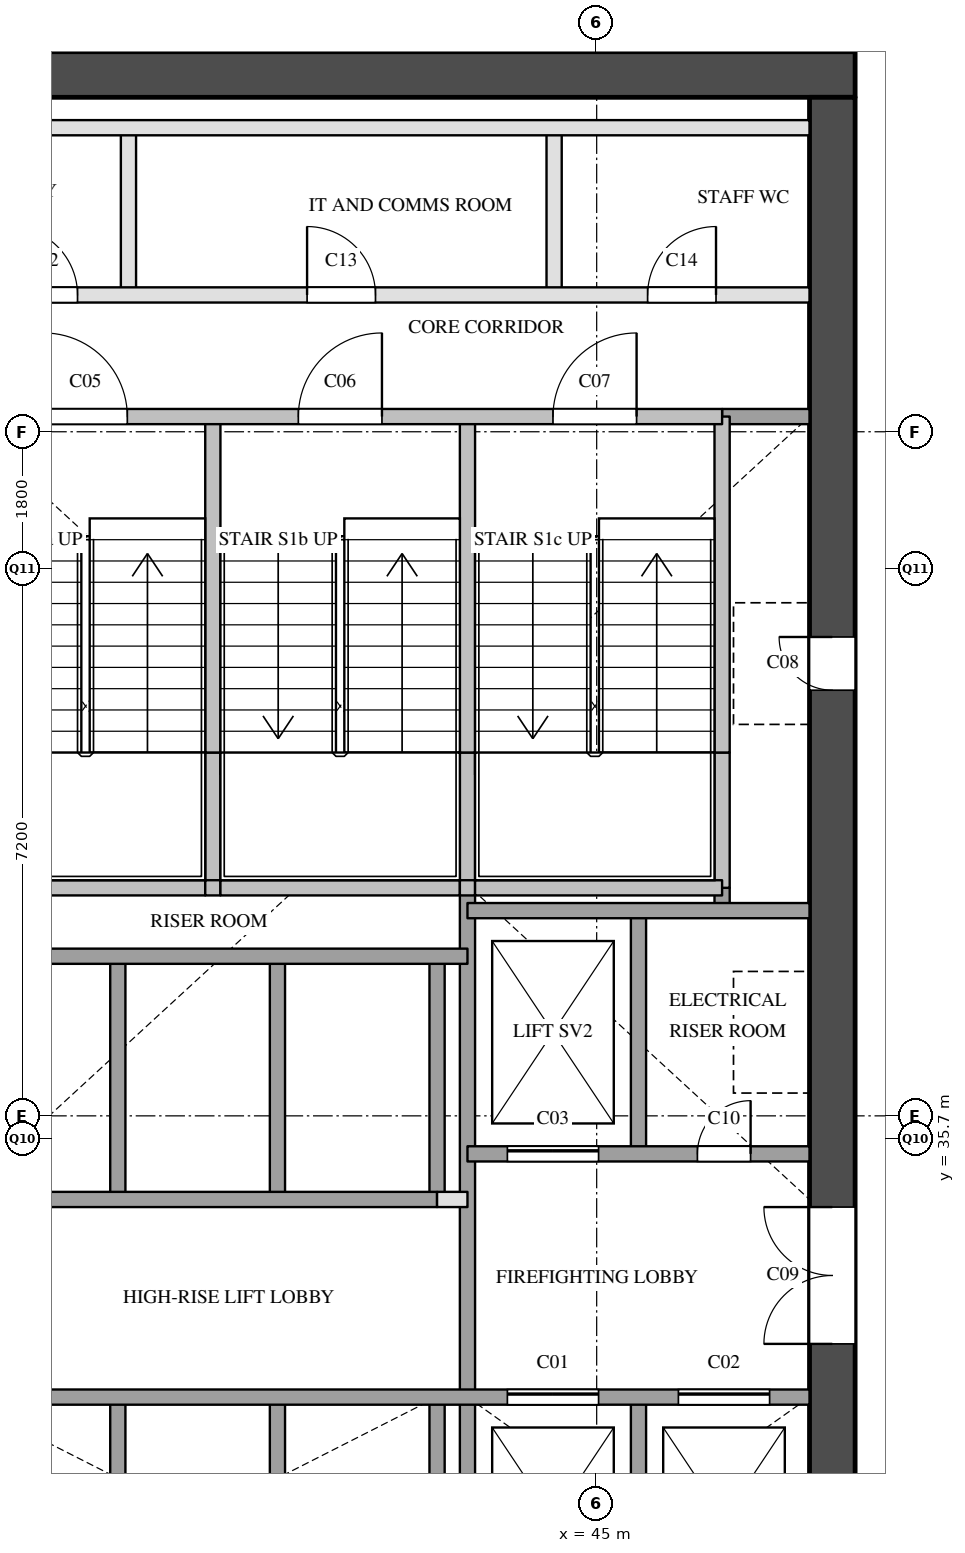
"""IFC4 building model, lengths in metres.
Left out: names, types, materials, properties, quantities, classifications, styles, units other than length and angle.
Written with IfcOpenShell. Run it as: python <this file> out.ifc"""

import sys

from ifc_helpers import new_model, si_unit, direction, frame, frame_2d, origin, place, context, subcontext, project, spatial, rectangle, extrude, element, fill, save


model = new_model("IFC4")
c1 = context("Model", 3, precision=1e-05, world=origin(), true_north=direction((0.0, 1.0)))
c2 = subcontext(c1, "Body", "Model", "MODEL_VIEW")
j1 = project(units=[si_unit("LENGTHUNIT", "METRE"), si_unit("PLANEANGLEUNIT", "RADIAN")], contexts=[c1])
p1 = place(None, origin())
s1 = spatial("IfcSite", under=j1, at=p1, CompositionType="ELEMENT")
p2 = place(p1, origin())
s2 = spatial("IfcBuilding", under=s1, at=p2, CompositionType="ELEMENT")
p3 = place(p2, frame((0.0, 0.0, 81.6)))
s3 = spatial("IfcBuildingStorey", under=s2, at=p3, CompositionType="ELEMENT", Elevation=81.6)
p4 = place(p3, frame((36.0, 49.7, 0.0), z_axis=(0.0, 0.0, 1.0), x_axis=(1.0, 0.0, 0.0)))
e1 = element("IfcWall", 1, at=p4, inside=s3, PredefinedType="SHEAR", context=c2, shape_type="SweptSolid", body=[
    extrude(rectangle(XDim=12.4, YDim=0.6, at=frame_2d((6.2, 0.0))), origin(), (0.0, 0.0, 1.0), 3.5),
])
p5 = place(p3, frame((48.1, 29.1, 0.0), z_axis=(0.0, 0.0, 1.0), x_axis=(0.0, 1.0, 0.0)))
e2 = element("IfcWall", 2, at=p5, inside=s3, PredefinedType="SHEAR", context=c2, shape_type="SweptSolid", body=[
    extrude(rectangle(XDim=20.3, YDim=0.6, at=frame_2d((10.15, 0.0))), origin(), (0.0, 0.0, 1.0), 3.5),
])
p6 = place(p5, frame((12.5, 0.0, 0.0)))
e3 = element("IfcOpeningElement", 3, at=p6, cuts=e2, PredefinedType="OPENING", context=c2, shape_type="SweptSolid", body=[
    extrude(rectangle(XDim=0.7, YDim=2.1, at=frame_2d((0.35, 1.05))), frame((0.0, 0.31, 0.0), z_axis=(0.0, -1.0, 0.0), x_axis=(1.0, 0.0, 0.0)), (0.0, 0.0, 1.0), 0.62),
])
p7 = place(p5, frame((3.9, 0.0, 0.0)))
e4 = element("IfcOpeningElement", 4, at=p7, cuts=e2, PredefinedType="OPENING", context=c2, shape_type="SweptSolid", body=[
    extrude(rectangle(XDim=1.8, YDim=2.1, at=frame_2d((0.9, 1.05))), frame((0.0, 0.31, 0.0), z_axis=(0.0, -1.0, 0.0), x_axis=(1.0, 0.0, 0.0)), (0.0, 0.0, 1.0), 0.62),
])
p8 = place(p3, frame((38.7, 29.1, 0.0), z_axis=(0.0, 0.0, 1.0), x_axis=(0.0, 1.0, 0.0)))
e5 = element("IfcWall", 5, at=p8, inside=s3, PredefinedType="SOLIDWALL", context=c2, shape_type="SweptSolid", body=[
    extrude(rectangle(XDim=3.2, YDim=0.2, at=frame_2d((1.6, 0.0))), origin(), (0.0, 0.0, 1.0), 3.5),
])
p9 = place(p3, frame((38.7, 34.9, 0.0), z_axis=(0.0, 0.0, 1.0), x_axis=(0.0, 1.0, 0.0)))
e6 = element("IfcWall", 6, at=p9, inside=s3, PredefinedType="SOLIDWALL", context=c2, shape_type="SweptSolid", body=[
    extrude(rectangle(XDim=3.2, YDim=0.2, at=frame_2d((1.6, 0.0))), origin(), (0.0, 0.0, 1.0), 3.5),
])
p10 = place(p3, frame((38.84, 46.8, 0.0), z_axis=(0.0, 0.0, 1.0), x_axis=(0.0, 1.0, 0.0)))
e7 = element("IfcWall", 7, at=p10, inside=s3, PredefinedType="PARTITIONING", context=c2, shape_type="SweptSolid", body=[
    extrude(rectangle(XDim=2.2, YDim=0.2, at=frame_2d((1.1, 0.0))), origin(), (0.0, 0.0, 1.0), 3.5),
])
p11 = place(p3, frame((39.95, 39.0, 0.0), z_axis=(0.0, 0.0, 1.0), x_axis=(0.0, 1.0, 0.0)))
e8 = element("IfcWall", 8, at=p11, inside=s3, PredefinedType="SOLIDWALL", context=c2, shape_type="SweptSolid", body=[
    extrude(rectangle(XDim=1.78, YDim=0.2, at=frame_2d((0.89, 0.0))), origin(), (0.0, 0.0, 1.0), 3.5),
])
p12 = place(p3, frame((39.95, 40.78, 0.0), z_axis=(0.0, 0.0, 1.0), x_axis=(0.0, 1.0, 0.0)))
e9 = element("IfcWall", 9, at=p12, inside=s3, PredefinedType="SOLIDWALL", context=c2, shape_type="SweptSolid", body=[
    extrude(rectangle(XDim=4.42, YDim=0.2, at=frame_2d((2.21, 0.0))), origin(), (0.0, 0.0, 1.0), 3.5),
])
p13 = place(p3, frame((40.8, 29.1, 0.0), z_axis=(0.0, 0.0, 1.0), x_axis=(0.0, 1.0, 0.0)))
e10 = element("IfcWall", 10, at=p13, inside=s3, PredefinedType="SOLIDWALL", context=c2, shape_type="SweptSolid", body=[
    extrude(rectangle(XDim=3.2, YDim=0.2, at=frame_2d((1.6, 0.0))), origin(), (0.0, 0.0, 1.0), 3.5),
])
p14 = place(p3, frame((40.8, 34.9, 0.0), z_axis=(0.0, 0.0, 1.0), x_axis=(0.0, 1.0, 0.0)))
e11 = element("IfcWall", 11, at=p14, inside=s3, PredefinedType="SOLIDWALL", context=c2, shape_type="SweptSolid", body=[
    extrude(rectangle(XDim=3.2, YDim=0.2, at=frame_2d((1.6, 0.0))), origin(), (0.0, 0.0, 1.0), 3.5),
])
p15 = place(p3, frame((42.9, 29.1, 0.0), z_axis=(0.0, 0.0, 1.0), x_axis=(0.0, 1.0, 0.0)))
e12 = element("IfcWall", 12, at=p15, inside=s3, PredefinedType="SOLIDWALL", context=c2, shape_type="SweptSolid", body=[
    extrude(rectangle(XDim=3.2, YDim=0.2, at=frame_2d((1.6, 0.0))), origin(), (0.0, 0.0, 1.0), 3.5),
])
p16 = place(p3, frame((42.9, 34.9, 0.0), z_axis=(0.0, 0.0, 1.0), x_axis=(0.0, 1.0, 0.0)))
e13 = element("IfcWall", 13, at=p16, inside=s3, PredefinedType="SOLIDWALL", context=c2, shape_type="SweptSolid", body=[
    extrude(rectangle(XDim=3.2, YDim=0.2, at=frame_2d((1.6, 0.0))), origin(), (0.0, 0.0, 1.0), 3.5),
])
p17 = place(p3, frame((43.3, 29.1, 0.0), z_axis=(0.0, 0.0, 1.0), x_axis=(0.0, 1.0, 0.0)))
e14 = element("IfcWall", 14, at=p17, inside=s3, PredefinedType="SOLIDWALL", context=c2, shape_type="SweptSolid", body=[
    extrude(rectangle(XDim=9.9, YDim=0.2, at=frame_2d((4.95, 0.0))), origin(), (0.0, 0.0, 1.0), 3.5),
])
p18 = place(p3, frame((43.3, 39.0, 0.0), z_axis=(0.0, 0.0, 1.0), x_axis=(0.0, 1.0, 0.0)))
e15 = element("IfcWall", 15, at=p18, inside=s3, PredefinedType="SOLIDWALL", context=c2, shape_type="SweptSolid", body=[
    extrude(rectangle(XDim=1.78, YDim=0.2, at=frame_2d((0.89, 0.0))), origin(), (0.0, 0.0, 1.0), 3.5),
])
p19 = place(p3, frame((43.3, 40.78, 0.0), z_axis=(0.0, 0.0, 1.0), x_axis=(0.0, 1.0, 0.0)))
e16 = element("IfcWall", 16, at=p19, inside=s3, PredefinedType="SOLIDWALL", context=c2, shape_type="SweptSolid", body=[
    extrude(rectangle(XDim=4.42, YDim=0.2, at=frame_2d((2.21, 0.0))), origin(), (0.0, 0.0, 1.0), 3.5),
])
p20 = place(p3, frame((44.44, 46.8, 0.0), z_axis=(0.0, 0.0, 1.0), x_axis=(0.0, 1.0, 0.0)))
e17 = element("IfcWall", 17, at=p20, inside=s3, PredefinedType="PARTITIONING", context=c2, shape_type="SweptSolid", body=[
    extrude(rectangle(XDim=2.2, YDim=0.2, at=frame_2d((1.1, 0.0))), origin(), (0.0, 0.0, 1.0), 3.5),
])
for number, where, z_axis, x_axis in (
    (18, (45.55, 29.1, 0.0), (0.0, 0.0, 1.0), (0.0, 1.0, 0.0)),
    (19, (45.55, 35.5, 0.0), (0.0, 0.0, 1.0), (0.0, 1.0, 0.0)),
):
    element("IfcWall", number, at=place(p3, frame(where, z_axis=z_axis, x_axis=x_axis)), inside=s3, PredefinedType="SOLIDWALL", context=c2, shape_type="SweptSolid", body=[
        extrude(rectangle(XDim=3.2, YDim=0.2, at=frame_2d((1.6, 0.0))), origin(), (0.0, 0.0, 1.0), 3.5),
    ])
p21 = place(p3, frame((46.65, 38.7, 0.0), z_axis=(0.0, 0.0, 1.0), x_axis=(0.0, 1.0, 0.0)))
e20 = element("IfcWall", 20, at=p21, inside=s3, PredefinedType="SOLIDWALL", context=c2, shape_type="SweptSolid", body=[
    extrude(rectangle(XDim=0.3, YDim=0.2, at=frame_2d((0.15, 0.0))), origin(), (0.0, 0.0, 1.0), 3.5),
])
p22 = place(p3, frame((46.65, 39.0, 0.0), z_axis=(0.0, 0.0, 1.0), x_axis=(0.0, 1.0, 0.0)))
e21 = element("IfcWall", 21, at=p22, inside=s3, PredefinedType="SOLIDWALL", context=c2, shape_type="SweptSolid", body=[
    extrude(rectangle(XDim=1.78, YDim=0.2, at=frame_2d((0.89, 0.0))), origin(), (0.0, 0.0, 1.0), 3.5),
])
p23 = place(p3, frame((46.65, 40.78, 0.0), z_axis=(0.0, 0.0, 1.0), x_axis=(0.0, 1.0, 0.0)))
e22 = element("IfcWall", 22, at=p23, inside=s3, PredefinedType="SOLIDWALL", context=c2, shape_type="SweptSolid", body=[
    extrude(rectangle(XDim=4.42, YDim=0.2, at=frame_2d((2.21, 0.0))), origin(), (0.0, 0.0, 1.0), 3.5),
])
p24 = place(p3, frame((36.6, 32.3, 0.0), z_axis=(0.0, 0.0, 1.0), x_axis=(1.0, 0.0, 0.0)))
e23 = element("IfcWall", 23, at=p24, inside=s3, PredefinedType="SOLIDWALL", context=c2, shape_type="SweptSolid", body=[
    extrude(rectangle(XDim=11.2, YDim=0.2, at=frame_2d((5.6, 0.0))), origin(), (0.0, 0.0, 1.0), 3.5),
])
p25 = place(p24, frame((7.225, 0.0, 0.0)))
e24 = element("IfcOpeningElement", 24, at=p25, cuts=e23, PredefinedType="OPENING", context=c2, shape_type="SweptSolid", body=[
    extrude(rectangle(XDim=1.2, YDim=2.1, at=frame_2d((0.6, 1.05))), frame((0.0, 0.11, 0.0), z_axis=(0.0, -1.0, 0.0), x_axis=(1.0, 0.0, 0.0)), (0.0, 0.0, 1.0), 0.22),
])
p26 = place(p24, frame((9.475, 0.0, 0.0)))
e25 = element("IfcOpeningElement", 25, at=p26, cuts=e23, PredefinedType="OPENING", context=c2, shape_type="SweptSolid", body=[
    extrude(rectangle(XDim=1.2, YDim=2.1, at=frame_2d((0.6, 1.05))), frame((0.0, 0.11, 0.0), z_axis=(0.0, -1.0, 0.0), x_axis=(1.0, 0.0, 0.0)), (0.0, 0.0, 1.0), 0.22),
])
p27 = place(p3, frame((42.9, 34.9, 0.0), z_axis=(0.0, 0.0, 1.0), x_axis=(1.0, 0.0, 0.0)))
e26 = element("IfcWall", 26, at=p27, inside=s3, PredefinedType="PARTITIONING", context=c2, shape_type="SweptSolid", body=[
    extrude(rectangle(XDim=0.4, YDim=0.2, at=frame_2d((0.2, 0.0))), origin(), (0.0, 0.0, 1.0), 3.5),
])
p28 = place(p3, frame((36.6, 34.9, 0.0), z_axis=(0.0, 0.0, 1.0), x_axis=(1.0, 0.0, 0.0)))
e27 = element("IfcWall", 27, at=p28, inside=s3, PredefinedType="SOLIDWALL", context=c2, shape_type="SweptSolid", body=[
    extrude(rectangle(XDim=6.3, YDim=0.2, at=frame_2d((3.15, 0.0))), origin(), (0.0, 0.0, 1.0), 3.5),
])
p29 = place(p3, frame((43.3, 35.5, 0.0), z_axis=(0.0, 0.0, 1.0), x_axis=(1.0, 0.0, 0.0)))
e28 = element("IfcWall", 28, at=p29, inside=s3, PredefinedType="SOLIDWALL", context=c2, shape_type="SweptSolid", body=[
    extrude(rectangle(XDim=4.5, YDim=0.2, at=frame_2d((2.25, 0.0))), origin(), (0.0, 0.0, 1.0), 3.5),
])
p30 = place(p29, frame((0.525, 0.0, 0.0)))
e29 = element("IfcOpeningElement", 29, at=p30, cuts=e28, PredefinedType="OPENING", context=c2, shape_type="SweptSolid", body=[
    extrude(rectangle(XDim=1.2, YDim=2.1, at=frame_2d((0.6, 1.05))), frame((0.0, 0.11, 0.0), z_axis=(0.0, -1.0, 0.0), x_axis=(1.0, 0.0, 0.0)), (0.0, 0.0, 1.0), 0.22),
])
p31 = place(p29, frame((3.025, 0.0, 0.0)))
e30 = element("IfcOpeningElement", 30, at=p31, cuts=e28, PredefinedType="OPENING", context=c2, shape_type="SweptSolid", body=[
    extrude(rectangle(XDim=0.7, YDim=2.1, at=frame_2d((0.35, 1.05))), frame((0.0, 0.11, 0.0), z_axis=(0.0, -1.0, 0.0), x_axis=(1.0, 0.0, 0.0)), (0.0, 0.0, 1.0), 0.22),
])
p32 = place(p3, frame((36.6, 38.1, 0.0), z_axis=(0.0, 0.0, 1.0), x_axis=(1.0, 0.0, 0.0)))
e31 = element("IfcWall", 31, at=p32, inside=s3, PredefinedType="SOLIDWALL", context=c2, shape_type="SweptSolid", body=[
    extrude(rectangle(XDim=6.7, YDim=0.2, at=frame_2d((3.35, 0.0))), origin(), (0.0, 0.0, 1.0), 3.5),
])
p33 = place(p3, frame((43.3, 38.7, 0.0), z_axis=(0.0, 0.0, 1.0), x_axis=(1.0, 0.0, 0.0)))
e32 = element("IfcWall", 32, at=p33, inside=s3, PredefinedType="SOLIDWALL", context=c2, shape_type="SweptSolid", body=[
    extrude(rectangle(XDim=4.5, YDim=0.2, at=frame_2d((2.25, 0.0))), origin(), (0.0, 0.0, 1.0), 3.5),
])
p34 = place(p3, frame((36.6, 39.0, 0.0), z_axis=(0.0, 0.0, 1.0), x_axis=(1.0, 0.0, 0.0)))
e33 = element("IfcWall", 33, at=p34, inside=s3, PredefinedType="SOLIDWALL", context=c2, shape_type="SweptSolid", body=[
    extrude(rectangle(XDim=3.25, YDim=0.2, at=frame_2d((1.625, 0.0))), origin(), (0.0, 0.0, 1.0), 3.5),
])
p35 = place(p3, frame((39.85, 39.0, 0.0), z_axis=(0.0, 0.0, 1.0), x_axis=(1.0, 0.0, 0.0)))
e34 = element("IfcWall", 34, at=p35, inside=s3, PredefinedType="SOLIDWALL", context=c2, shape_type="SweptSolid", body=[
    extrude(rectangle(XDim=0.2, YDim=0.2, at=frame_2d((0.1, 0.0))), origin(), (0.0, 0.0, 1.0), 3.5),
])
p36 = place(p3, frame((40.05, 39.0, 0.0), z_axis=(0.0, 0.0, 1.0), x_axis=(1.0, 0.0, 0.0)))
e35 = element("IfcWall", 35, at=p36, inside=s3, PredefinedType="SOLIDWALL", context=c2, shape_type="SweptSolid", body=[
    extrude(rectangle(XDim=3.15, YDim=0.2, at=frame_2d((1.575, 0.0))), origin(), (0.0, 0.0, 1.0), 3.5),
])
p37 = place(p3, frame((43.2, 39.0, 0.0), z_axis=(0.0, 0.0, 1.0), x_axis=(1.0, 0.0, 0.0)))
e36 = element("IfcWall", 36, at=p37, inside=s3, PredefinedType="SOLIDWALL", context=c2, shape_type="SweptSolid", body=[
    extrude(rectangle(XDim=0.2, YDim=0.2, at=frame_2d((0.1, 0.0))), origin(), (0.0, 0.0, 1.0), 3.5),
])
p38 = place(p3, frame((43.4, 39.0, 0.0), z_axis=(0.0, 0.0, 1.0), x_axis=(1.0, 0.0, 0.0)))
e37 = element("IfcWall", 37, at=p38, inside=s3, PredefinedType="SOLIDWALL", context=c2, shape_type="SweptSolid", body=[
    extrude(rectangle(XDim=3.25, YDim=0.2, at=frame_2d((1.625, 0.0))), origin(), (0.0, 0.0, 1.0), 3.5),
])
p39 = place(p3, frame((46.65, 45.2, 0.0), z_axis=(0.0, 0.0, 1.0), x_axis=(1.0, 0.0, 0.0)))
e38 = element("IfcWall", 38, at=p39, inside=s3, PredefinedType="SOLIDWALL", context=c2, shape_type="SweptSolid", body=[
    extrude(rectangle(XDim=1.15, YDim=0.2, at=frame_2d((0.575, 0.0))), origin(), (0.0, 0.0, 1.0), 3.5),
])
p40 = place(p3, frame((36.6, 45.2, 0.0), z_axis=(0.0, 0.0, 1.0), x_axis=(1.0, 0.0, 0.0)))
e39 = element("IfcWall", 39, at=p40, inside=s3, PredefinedType="SOLIDWALL", context=c2, shape_type="SweptSolid", body=[
    extrude(rectangle(XDim=10.05, YDim=0.2, at=frame_2d((5.025, 0.0))), origin(), (0.0, 0.0, 1.0), 3.5),
])
p41 = place(p40, frame((1.125, 0.0, 0.0)))
e40 = element("IfcOpeningElement", 40, at=p41, cuts=e39, PredefinedType="OPENING", context=c2, shape_type="SweptSolid", body=[
    extrude(rectangle(XDim=1.1, YDim=2.1, at=frame_2d((0.55, 1.05))), frame((0.0, 0.11, 0.0), z_axis=(0.0, -1.0, 0.0), x_axis=(1.0, 0.0, 0.0)), (0.0, 0.0, 1.0), 0.22),
])
p42 = place(p40, frame((4.475, 0.0, 0.0)))
e41 = element("IfcOpeningElement", 41, at=p42, cuts=e39, PredefinedType="OPENING", context=c2, shape_type="SweptSolid", body=[
    extrude(rectangle(XDim=1.1, YDim=2.1, at=frame_2d((0.55, 1.05))), frame((0.0, 0.11, 0.0), z_axis=(0.0, -1.0, 0.0), x_axis=(1.0, 0.0, 0.0)), (0.0, 0.0, 1.0), 0.22),
])
p43 = place(p40, frame((7.825, 0.0, 0.0)))
e42 = element("IfcOpeningElement", 42, at=p43, cuts=e39, PredefinedType="OPENING", context=c2, shape_type="SweptSolid", body=[
    extrude(rectangle(XDim=1.1, YDim=2.1, at=frame_2d((0.55, 1.05))), frame((0.0, 0.11, 0.0), z_axis=(0.0, -1.0, 0.0), x_axis=(1.0, 0.0, 0.0)), (0.0, 0.0, 1.0), 0.22),
])
p44 = place(p3, frame((36.6, 46.8, 0.0), z_axis=(0.0, 0.0, 1.0), x_axis=(1.0, 0.0, 0.0)))
e43 = element("IfcWall", 43, at=p44, inside=s3, PredefinedType="PARTITIONING", context=c2, shape_type="SweptSolid", body=[
    extrude(rectangle(XDim=11.2, YDim=0.2, at=frame_2d((5.6, 0.0))), origin(), (0.0, 0.0, 1.0), 3.5),
])
p45 = place(p44, frame((0.67, 0.0, 0.0)))
e44 = element("IfcOpeningElement", 44, at=p45, cuts=e43, PredefinedType="OPENING", context=c2, shape_type="SweptSolid", body=[
    extrude(rectangle(XDim=0.9, YDim=2.1, at=frame_2d((0.45, 1.05))), frame((0.0, 0.11, 0.0), z_axis=(0.0, -1.0, 0.0), x_axis=(1.0, 0.0, 0.0)), (0.0, 0.0, 1.0), 0.22),
])
p46 = place(p44, frame((4.59, 0.0, 0.0)))
e45 = element("IfcOpeningElement", 45, at=p46, cuts=e43, PredefinedType="OPENING", context=c2, shape_type="SweptSolid", body=[
    extrude(rectangle(XDim=0.9, YDim=2.1, at=frame_2d((0.45, 1.05))), frame((0.0, 0.11, 0.0), z_axis=(0.0, -1.0, 0.0), x_axis=(1.0, 0.0, 0.0)), (0.0, 0.0, 1.0), 0.22),
])
p47 = place(p44, frame((9.07, 0.0, 0.0)))
e46 = element("IfcOpeningElement", 46, at=p47, cuts=e43, PredefinedType="OPENING", context=c2, shape_type="SweptSolid", body=[
    extrude(rectangle(XDim=0.9, YDim=2.1, at=frame_2d((0.45, 1.05))), frame((0.0, 0.11, 0.0), z_axis=(0.0, -1.0, 0.0), x_axis=(1.0, 0.0, 0.0)), (0.0, 0.0, 1.0), 0.22),
])
p48 = place(p3, frame((36.6, 49.0, 0.0), z_axis=(0.0, 0.0, 1.0), x_axis=(1.0, 0.0, 0.0)))
e47 = element("IfcWall", 47, at=p48, inside=s3, PredefinedType="PARTITIONING", context=c2, shape_type="SweptSolid", body=[
    extrude(rectangle(XDim=11.2, YDim=0.2, at=frame_2d((5.6, 0.0))), origin(), (0.0, 0.0, 1.0), 3.5),
])
p49 = place(p25, origin())
e48 = element("IfcDoor", 48, at=p49, inside=s3, OperationType="SLIDING_TO_LEFT", PredefinedType="DOOR", context=c2, shape_type="SweptSolid", body=[
    extrude(rectangle(XDim=1.2, YDim=2.1, at=frame_2d((0.6, 1.05))), frame((0.0, 0.025, 0.0), z_axis=(0.0, -1.0, 0.0), x_axis=(1.0, 0.0, 0.0)), (0.0, 0.0, 1.0), 0.05),
])
fill(e24, e48)
p50 = place(p26, origin())
e49 = element("IfcDoor", 49, at=p50, inside=s3, OperationType="SLIDING_TO_LEFT", PredefinedType="DOOR", context=c2, shape_type="SweptSolid", body=[
    extrude(rectangle(XDim=1.2, YDim=2.1, at=frame_2d((0.6, 1.05))), frame((0.0, 0.025, 0.0), z_axis=(0.0, -1.0, 0.0), x_axis=(1.0, 0.0, 0.0)), (0.0, 0.0, 1.0), 0.05),
])
fill(e25, e49)
p51 = place(p30, origin())
e50 = element("IfcDoor", 50, at=p51, inside=s3, OperationType="SLIDING_TO_LEFT", PredefinedType="DOOR", context=c2, shape_type="SweptSolid", body=[
    extrude(rectangle(XDim=1.2, YDim=2.1, at=frame_2d((0.6, 1.05))), frame((0.0, 0.025, 0.0), z_axis=(0.0, -1.0, 0.0), x_axis=(1.0, 0.0, 0.0)), (0.0, 0.0, 1.0), 0.05),
])
fill(e29, e50)
p52 = place(p41, origin())
e51 = element("IfcDoor", 51, at=p52, inside=s3, OperationType="SINGLE_SWING_LEFT", PredefinedType="DOOR", context=c2, shape_type="SweptSolid", body=[
    extrude(rectangle(XDim=1.1, YDim=2.1, at=frame_2d((0.55, 1.05))), frame((0.0, 0.025, 0.0), z_axis=(0.0, -1.0, 0.0), x_axis=(1.0, 0.0, 0.0)), (0.0, 0.0, 1.0), 0.05),
])
fill(e40, e51)
p53 = place(p42, origin())
e52 = element("IfcDoor", 52, at=p53, inside=s3, OperationType="SINGLE_SWING_RIGHT", PredefinedType="DOOR", context=c2, shape_type="SweptSolid", body=[
    extrude(rectangle(XDim=1.1, YDim=2.1, at=frame_2d((0.55, 1.05))), frame((0.0, 0.025, 0.0), z_axis=(0.0, -1.0, 0.0), x_axis=(1.0, 0.0, 0.0)), (0.0, 0.0, 1.0), 0.05),
])
fill(e41, e52)
p54 = place(p43, origin())
e53 = element("IfcDoor", 53, at=p54, inside=s3, OperationType="SINGLE_SWING_RIGHT", PredefinedType="DOOR", context=c2, shape_type="SweptSolid", body=[
    extrude(rectangle(XDim=1.1, YDim=2.1, at=frame_2d((0.55, 1.05))), frame((0.0, 0.025, 0.0), z_axis=(0.0, -1.0, 0.0), x_axis=(1.0, 0.0, 0.0)), (0.0, 0.0, 1.0), 0.05),
])
fill(e42, e53)
p55 = place(p6, origin())
e54 = element("IfcDoor", 54, at=p55, inside=s3, OperationType="SINGLE_SWING_RIGHT", PredefinedType="DOOR", context=c2, shape_type="SweptSolid", body=[
    extrude(rectangle(XDim=0.7, YDim=2.1, at=frame_2d((0.35, 1.05))), frame((0.0, 0.025, 0.0), z_axis=(0.0, -1.0, 0.0), x_axis=(1.0, 0.0, 0.0)), (0.0, 0.0, 1.0), 0.05),
])
fill(e3, e54)
p56 = place(p7, origin())
e55 = element("IfcDoor", 55, at=p56, inside=s3, OperationType="DOUBLE_DOOR_SINGLE_SWING", PredefinedType="DOOR", context=c2, shape_type="SweptSolid", body=[
    extrude(rectangle(XDim=1.8, YDim=2.1, at=frame_2d((0.9, 1.05))), frame((0.0, 0.025, 0.0), z_axis=(0.0, -1.0, 0.0), x_axis=(1.0, 0.0, 0.0)), (0.0, 0.0, 1.0), 0.05),
])
fill(e4, e55)
p57 = place(p31, origin())
e56 = element("IfcDoor", 56, at=p57, inside=s3, OperationType="SINGLE_SWING_RIGHT", PredefinedType="DOOR", context=c2, shape_type="SweptSolid", body=[
    extrude(rectangle(XDim=0.7, YDim=2.1, at=frame_2d((0.35, 1.05))), frame((0.0, 0.025, 0.0), z_axis=(0.0, -1.0, 0.0), x_axis=(1.0, 0.0, 0.0)), (0.0, 0.0, 1.0), 0.05),
])
fill(e30, e56)
p58 = place(p45, origin())
e57 = element("IfcDoor", 57, at=p58, inside=s3, OperationType="SINGLE_SWING_LEFT", PredefinedType="DOOR", context=c2, shape_type="SweptSolid", body=[
    extrude(rectangle(XDim=0.9, YDim=2.1, at=frame_2d((0.45, 1.05))), frame((0.0, 0.025, 0.0), z_axis=(0.0, -1.0, 0.0), x_axis=(1.0, 0.0, 0.0)), (0.0, 0.0, 1.0), 0.05),
])
fill(e44, e57)
p59 = place(p46, origin())
e58 = element("IfcDoor", 58, at=p59, inside=s3, OperationType="SINGLE_SWING_LEFT", PredefinedType="DOOR", context=c2, shape_type="SweptSolid", body=[
    extrude(rectangle(XDim=0.9, YDim=2.1, at=frame_2d((0.45, 1.05))), frame((0.0, 0.025, 0.0), z_axis=(0.0, -1.0, 0.0), x_axis=(1.0, 0.0, 0.0)), (0.0, 0.0, 1.0), 0.05),
])
fill(e45, e58)
p60 = place(p47, origin())
e59 = element("IfcDoor", 59, at=p60, inside=s3, OperationType="SINGLE_SWING_RIGHT", PredefinedType="DOOR", context=c2, shape_type="SweptSolid", body=[
    extrude(rectangle(XDim=0.9, YDim=2.1, at=frame_2d((0.45, 1.05))), frame((0.0, 0.025, 0.0), z_axis=(0.0, -1.0, 0.0), x_axis=(1.0, 0.0, 0.0)), (0.0, 0.0, 1.0), 0.05),
])
fill(e46, e59)
save(model, sys.argv[1])
